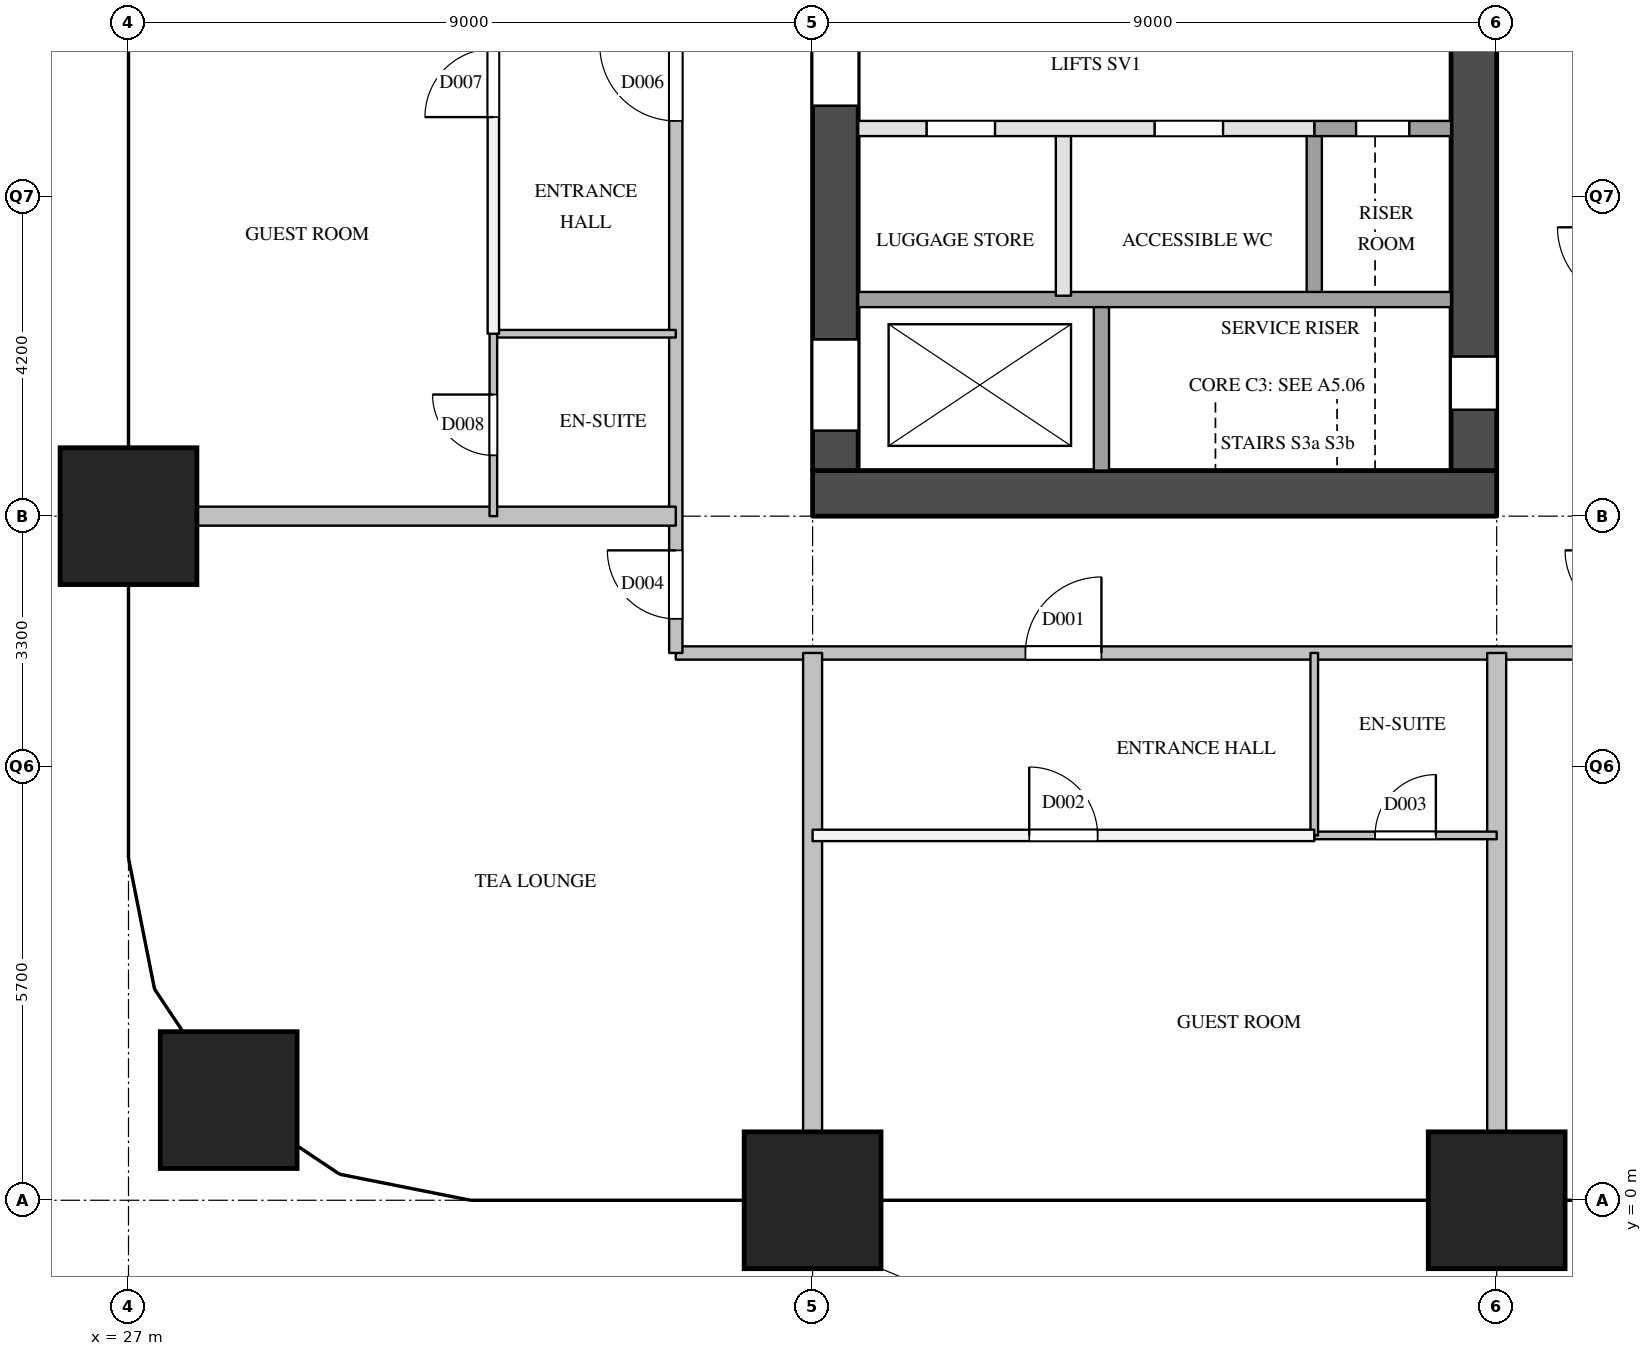
"""IFC4 building model, lengths in metres.
Left out: names, types, materials, properties, quantities, classifications, styles, units other than length and angle.
Written with IfcOpenShell. Run it as: python <this file> out.ifc"""

import sys

from ifc_helpers import new_model, si_unit, direction, frame, frame_2d, origin, origin_2d, place, context, subcontext, project, spatial, rectangle, extrude, element, fill, save


model = new_model("IFC4")
c1 = context("Model", 3, precision=1e-05, world=origin(), true_north=direction((0.0, 1.0)))
c2 = subcontext(c1, "Body", "Model", "MODEL_VIEW")
j1 = project(units=[si_unit("LENGTHUNIT", "METRE"), si_unit("PLANEANGLEUNIT", "RADIAN")], contexts=[c1])
p1 = place(None, origin())
s1 = spatial("IfcSite", under=j1, at=p1, CompositionType="ELEMENT")
p2 = place(p1, origin())
s2 = spatial("IfcBuilding", under=s1, at=p2, CompositionType="ELEMENT")
p3 = place(p2, frame((0.0, 0.0, 100.6)))
s3 = spatial("IfcBuildingStorey", under=s2, at=p3, CompositionType="ELEMENT", Elevation=100.6)
for number, where, z_axis, x_axis in (
    (1, (28.318, 1.318, 0.0), (0.0, 0.0, 1.0), (1.0, 0.0, 0.0)),
    (2, (27.0, 9.0, 0.0), (0.0, 0.0, 1.0), (1.0, 0.0, 0.0)),
    (3, (36.0, 0.0, 0.0), (0.0, 0.0, 1.0), (1.0, 0.0, 0.0)),
    (4, (45.0, 0.0, 0.0), (0.0, 0.0, 1.0), (1.0, 0.0, 0.0)),
):
    element("IfcColumn", number, at=place(p3, frame(where, z_axis=z_axis, x_axis=x_axis)), inside=s3, PredefinedType="COLUMN", context=c2, shape_type="SweptSolid", body=[
        extrude(rectangle(XDim=1.8, YDim=1.8, at=origin_2d()), origin(), (0.0, 0.0, 1.0), 3.8),
    ])
p4 = place(p3, frame((36.0, 9.3, 0.0), z_axis=(0.0, 0.0, 1.0), x_axis=(1.0, 0.0, 0.0)))
e5 = element("IfcWall", 5, at=p4, inside=s3, PredefinedType="SHEAR", context=c2, shape_type="SweptSolid", body=[
    extrude(rectangle(XDim=9.0, YDim=0.6, at=frame_2d((4.5, 0.0))), origin(), (0.0, 0.0, 1.0), 3.5),
])
p5 = place(p3, frame((36.3, 9.6, 0.0), z_axis=(0.0, 0.0, 1.0), x_axis=(0.0, 1.0, 0.0)))
e6 = element("IfcWall", 6, at=p5, inside=s3, PredefinedType="SHEAR", context=c2, shape_type="SweptSolid", body=[
    extrude(rectangle(XDim=12.3, YDim=0.6, at=frame_2d((6.15, 0.0))), origin(), (0.0, 0.0, 1.0), 3.5),
])
p6 = place(p5, frame((0.525, 0.0, 0.0)))
e7 = element("IfcOpeningElement", 7, at=p6, cuts=e6, PredefinedType="OPENING", context=c2, shape_type="SweptSolid", body=[
    extrude(rectangle(XDim=1.2, YDim=2.1, at=frame_2d((0.6, 1.05))), frame((0.0, 0.31, 0.0), z_axis=(0.0, -1.0, 0.0), x_axis=(1.0, 0.0, 0.0)), (0.0, 0.0, 1.0), 0.62),
])
p7 = place(p5, frame((4.8, 0.0, 0.0)))
e8 = element("IfcOpeningElement", 8, at=p7, cuts=e6, PredefinedType="OPENING", context=c2, shape_type="SweptSolid", body=[
    extrude(rectangle(XDim=1.0, YDim=2.1, at=frame_2d((0.5, 1.05))), frame((0.0, 0.31, 0.0), z_axis=(0.0, -1.0, 0.0), x_axis=(1.0, 0.0, 0.0)), (0.0, 0.0, 1.0), 0.62),
])
p8 = place(p3, frame((44.7, 9.6, 0.0), z_axis=(0.0, 0.0, 1.0), x_axis=(0.0, 1.0, 0.0)))
e9 = element("IfcWall", 9, at=p8, inside=s3, PredefinedType="SHEAR", context=c2, shape_type="SweptSolid", body=[
    extrude(rectangle(XDim=12.3, YDim=0.6, at=frame_2d((6.15, 0.0))), origin(), (0.0, 0.0, 1.0), 3.5),
])
p9 = place(p8, frame((0.8, 0.0, 0.0)))
e10 = element("IfcOpeningElement", 10, at=p9, cuts=e9, PredefinedType="OPENING", context=c2, shape_type="SweptSolid", body=[
    extrude(rectangle(XDim=0.7, YDim=2.1, at=frame_2d((0.35, 1.05))), frame((0.0, 0.31, 0.0), z_axis=(0.0, -1.0, 0.0), x_axis=(1.0, 0.0, 0.0)), (0.0, 0.0, 1.0), 0.62),
])
p10 = place(p3, frame((39.3, 11.9, 0.0), z_axis=(0.0, 0.0, 1.0), x_axis=(0.0, 1.0, 0.0)))
e11 = element("IfcWall", 11, at=p10, inside=s3, PredefinedType="PARTITIONING", context=c2, shape_type="SweptSolid", body=[
    extrude(rectangle(XDim=2.2, YDim=0.2, at=frame_2d((1.1, 0.0))), origin(), (0.0, 0.0, 1.0), 3.5),
])
p11 = place(p3, frame((39.8, 9.6, 0.0), z_axis=(0.0, 0.0, 1.0), x_axis=(0.0, 1.0, 0.0)))
e12 = element("IfcWall", 12, at=p11, inside=s3, PredefinedType="SOLIDWALL", context=c2, shape_type="SweptSolid", body=[
    extrude(rectangle(XDim=2.3, YDim=0.2, at=frame_2d((1.15, 0.0))), origin(), (0.0, 0.0, 1.0), 3.5),
])
p12 = place(p3, frame((42.6, 11.9, 0.0), z_axis=(0.0, 0.0, 1.0), x_axis=(0.0, 1.0, 0.0)))
e13 = element("IfcWall", 13, at=p12, inside=s3, PredefinedType="SOLIDWALL", context=c2, shape_type="SweptSolid", body=[
    extrude(rectangle(XDim=2.2, YDim=0.2, at=frame_2d((1.1, 0.0))), origin(), (0.0, 0.0, 1.0), 3.5),
])
p13 = place(p3, frame((36.6, 11.85, 0.0), z_axis=(0.0, 0.0, 1.0), x_axis=(1.0, 0.0, 0.0)))
e14 = element("IfcWall", 14, at=p13, inside=s3, PredefinedType="SOLIDWALL", context=c2, shape_type="SweptSolid", body=[
    extrude(rectangle(XDim=7.8, YDim=0.2, at=frame_2d((3.9, 0.0))), origin(), (0.0, 0.0, 1.0), 3.5),
])
p14 = place(p3, frame((36.6, 14.1, 0.0), z_axis=(0.0, 0.0, 1.0), x_axis=(1.0, 0.0, 0.0)))
e15 = element("IfcWall", 15, at=p14, inside=s3, PredefinedType="PARTITIONING", context=c2, shape_type="SweptSolid", body=[
    extrude(rectangle(XDim=6.0, YDim=0.2, at=frame_2d((3.0, 0.0))), origin(), (0.0, 0.0, 1.0), 3.5),
])
p15 = place(p14, frame((0.9, 0.0, 0.0)))
e16 = element("IfcOpeningElement", 16, at=p15, cuts=e15, PredefinedType="OPENING", context=c2, shape_type="SweptSolid", body=[
    extrude(rectangle(XDim=0.9, YDim=2.1, at=frame_2d((0.45, 1.05))), frame((0.0, 0.11, 0.0), z_axis=(0.0, -1.0, 0.0), x_axis=(1.0, 0.0, 0.0)), (0.0, 0.0, 1.0), 0.22),
])
p16 = place(p14, frame((3.9, 0.0, 0.0)))
e17 = element("IfcOpeningElement", 17, at=p16, cuts=e15, PredefinedType="OPENING", context=c2, shape_type="SweptSolid", body=[
    extrude(rectangle(XDim=0.9, YDim=2.1, at=frame_2d((0.45, 1.05))), frame((0.0, 0.11, 0.0), z_axis=(0.0, -1.0, 0.0), x_axis=(1.0, 0.0, 0.0)), (0.0, 0.0, 1.0), 0.22),
])
p17 = place(p3, frame((42.6, 14.1, 0.0), z_axis=(0.0, 0.0, 1.0), x_axis=(1.0, 0.0, 0.0)))
e18 = element("IfcWall", 18, at=p17, inside=s3, PredefinedType="SOLIDWALL", context=c2, shape_type="SweptSolid", body=[
    extrude(rectangle(XDim=1.8, YDim=0.2, at=frame_2d((0.9, 0.0))), origin(), (0.0, 0.0, 1.0), 3.5),
])
p18 = place(p17, frame((0.55, 0.0, 0.0)))
e19 = element("IfcOpeningElement", 19, at=p18, cuts=e18, PredefinedType="OPENING", context=c2, shape_type="SweptSolid", body=[
    extrude(rectangle(XDim=0.7, YDim=2.1, at=frame_2d((0.35, 1.05))), frame((0.0, 0.11, 0.0), z_axis=(0.0, -1.0, 0.0), x_axis=(1.0, 0.0, 0.0)), (0.0, 0.0, 1.0), 0.22),
])
p19 = place(p3, frame((34.2, 7.2, 0.0), z_axis=(0.0, 0.0, 1.0), x_axis=(1.0, 0.0, 0.0)))
e20 = element("IfcWall", 20, at=p19, inside=s3, PredefinedType="PARTITIONING", context=c2, shape_type="SweptSolid", body=[
    extrude(rectangle(XDim=12.6, YDim=0.175, at=frame_2d((6.3, 0.0))), origin(), (0.0, 0.0, 1.0), 3.5),
])
p20 = place(p19, frame((4.6, 0.0, 0.0)))
e21 = element("IfcOpeningElement", 21, at=p20, cuts=e20, PredefinedType="OPENING", context=c2, shape_type="SweptSolid", body=[
    extrude(rectangle(XDim=1.0, YDim=2.1, at=frame_2d((0.5, 1.05))), frame((0.0, 0.097, 0.0), z_axis=(0.0, -1.0, 0.0), x_axis=(1.0, 0.0, 0.0)), (0.0, 0.0, 1.0), 0.195),
])
p21 = place(p3, frame((34.2, 7.2, 0.0), z_axis=(0.0, 0.0, 1.0), x_axis=(0.0, 1.0, 0.0)))
e22 = element("IfcWall", 22, at=p21, inside=s3, PredefinedType="PARTITIONING", context=c2, shape_type="SweptSolid", body=[
    extrude(rectangle(XDim=16.49, YDim=0.175, at=frame_2d((8.245, 0.0))), origin(), (0.0, 0.0, 1.0), 3.5),
])
p22 = place(p21, frame((0.45, 0.0, 0.0)))
e23 = element("IfcOpeningElement", 23, at=p22, cuts=e22, PredefinedType="OPENING", context=c2, shape_type="SweptSolid", body=[
    extrude(rectangle(XDim=0.9, YDim=2.1, at=frame_2d((0.45, 1.05))), frame((0.0, 0.097, 0.0), z_axis=(0.0, -1.0, 0.0), x_axis=(1.0, 0.0, 0.0)), (0.0, 0.0, 1.0), 0.195),
])
p23 = place(p21, frame((7.0, 0.0, 0.0)))
e24 = element("IfcOpeningElement", 24, at=p23, cuts=e22, PredefinedType="OPENING", context=c2, shape_type="SweptSolid", body=[
    extrude(rectangle(XDim=1.0, YDim=2.1, at=frame_2d((0.5, 1.05))), frame((0.0, 0.097, 0.0), z_axis=(0.0, -1.0, 0.0), x_axis=(1.0, 0.0, 0.0)), (0.0, 0.0, 1.0), 0.195),
])
p24 = place(p21, frame((14.345, 0.0, 0.0)))
e25 = element("IfcOpeningElement", 25, at=p24, cuts=e22, PredefinedType="OPENING", context=c2, shape_type="SweptSolid", body=[
    extrude(rectangle(XDim=1.0, YDim=2.1, at=frame_2d((0.5, 1.05))), frame((0.0, 0.097, 0.0), z_axis=(0.0, -1.0, 0.0), x_axis=(1.0, 0.0, 0.0)), (0.0, 0.0, 1.0), 0.195),
])
p25 = place(p3, frame((36.0, 4.8, 0.0), z_axis=(0.0, 0.0, 1.0), x_axis=(1.0, 0.0, 0.0)))
e26 = element("IfcWall", 26, at=p25, inside=s3, PredefinedType="PARTITIONING", context=c2, shape_type="SweptSolid", body=[
    extrude(rectangle(XDim=6.6, YDim=0.15, at=frame_2d((3.3, 0.0))), origin(), (0.0, 0.0, 1.0), 3.5),
])
p26 = place(p25, frame((2.85, 0.0, 0.0)))
e27 = element("IfcOpeningElement", 27, at=p26, cuts=e26, PredefinedType="OPENING", context=c2, shape_type="SweptSolid", body=[
    extrude(rectangle(XDim=0.9, YDim=2.1, at=frame_2d((0.45, 1.05))), frame((0.0, 0.085, 0.0), z_axis=(0.0, -1.0, 0.0), x_axis=(1.0, 0.0, 0.0)), (0.0, 0.0, 1.0), 0.17),
])
p27 = place(p3, frame((31.8, 11.4, 0.0), z_axis=(0.0, 0.0, 1.0), x_axis=(0.0, 1.0, 0.0)))
e28 = element("IfcWall", 28, at=p27, inside=s3, PredefinedType="PARTITIONING", context=c2, shape_type="SweptSolid", body=[
    extrude(rectangle(XDim=6.6, YDim=0.15, at=frame_2d((3.3, 0.0))), origin(), (0.0, 0.0, 1.0), 3.5),
])
p28 = place(p27, frame((2.85, 0.0, 0.0)))
e29 = element("IfcOpeningElement", 29, at=p28, cuts=e28, PredefinedType="OPENING", context=c2, shape_type="SweptSolid", body=[
    extrude(rectangle(XDim=0.9, YDim=2.1, at=frame_2d((0.45, 1.05))), frame((0.0, 0.085, 0.0), z_axis=(0.0, -1.0, 0.0), x_axis=(1.0, 0.0, 0.0)), (0.0, 0.0, 1.0), 0.17),
])
for number, where, z_axis, x_axis in (
    (30, (27.0, 9.0, 0.0), (0.0, 0.0, 1.0), (1.0, 0.0, 0.0)),
    (31, (36.0, 0.0, 0.0), (0.0, 0.0, 1.0), (0.0, 1.0, 0.0)),
    (32, (45.0, 0.0, 0.0), (0.0, 0.0, 1.0), (0.0, 1.0, 0.0)),
):
    element("IfcWall", number, at=place(p3, frame(where, z_axis=z_axis, x_axis=x_axis)), inside=s3, PredefinedType="PARTITIONING", context=c2, shape_type="SweptSolid", body=[
        extrude(rectangle(XDim=7.2, YDim=0.25, at=frame_2d((3.6, 0.0))), origin(), (0.0, 0.0, 1.0), 3.5),
    ])
p29 = place(p3, frame((42.6, 4.8, 0.0), z_axis=(0.0, 0.0, 1.0), x_axis=(1.0, 0.0, 0.0)))
e33 = element("IfcWall", 33, at=p29, inside=s3, PredefinedType="PARTITIONING", context=c2, shape_type="SweptSolid", body=[
    extrude(rectangle(XDim=2.4, YDim=0.1, at=frame_2d((1.2, 0.0))), origin(), (0.0, 0.0, 1.0), 3.5),
])
p30 = place(p29, frame((0.8, 0.0, 0.0)))
e34 = element("IfcOpeningElement", 34, at=p30, cuts=e33, PredefinedType="OPENING", context=c2, shape_type="SweptSolid", body=[
    extrude(rectangle(XDim=0.8, YDim=2.1, at=frame_2d((0.4, 1.05))), frame((0.0, 0.06, 0.0), z_axis=(0.0, -1.0, 0.0), x_axis=(1.0, 0.0, 0.0)), (0.0, 0.0, 1.0), 0.12),
])
p31 = place(p3, frame((31.8, 11.4, 0.0), z_axis=(0.0, 0.0, 1.0), x_axis=(1.0, 0.0, 0.0)))
e35 = element("IfcWall", 35, at=p31, inside=s3, PredefinedType="PARTITIONING", context=c2, shape_type="SweptSolid", body=[
    extrude(rectangle(XDim=2.4, YDim=0.1, at=frame_2d((1.2, 0.0))), origin(), (0.0, 0.0, 1.0), 3.5),
])
p32 = place(p3, frame((31.8, 9.0, 0.0), z_axis=(0.0, 0.0, 1.0), x_axis=(0.0, 1.0, 0.0)))
e36 = element("IfcWall", 36, at=p32, inside=s3, PredefinedType="PARTITIONING", context=c2, shape_type="SweptSolid", body=[
    extrude(rectangle(XDim=2.4, YDim=0.1, at=frame_2d((1.2, 0.0))), origin(), (0.0, 0.0, 1.0), 3.5),
])
p33 = place(p32, frame((0.8, 0.0, 0.0)))
e37 = element("IfcOpeningElement", 37, at=p33, cuts=e36, PredefinedType="OPENING", context=c2, shape_type="SweptSolid", body=[
    extrude(rectangle(XDim=0.8, YDim=2.1, at=frame_2d((0.4, 1.05))), frame((0.0, 0.06, 0.0), z_axis=(0.0, -1.0, 0.0), x_axis=(1.0, 0.0, 0.0)), (0.0, 0.0, 1.0), 0.12),
])
p34 = place(p3, frame((42.6, 4.8, 0.0), z_axis=(0.0, 0.0, 1.0), x_axis=(0.0, 1.0, 0.0)))
e38 = element("IfcWall", 38, at=p34, inside=s3, PredefinedType="PARTITIONING", context=c2, shape_type="SweptSolid", body=[
    extrude(rectangle(XDim=2.4, YDim=0.1, at=frame_2d((1.2, 0.0))), origin(), (0.0, 0.0, 1.0), 3.5),
])
p35 = place(p6, origin())
e39 = element("IfcDoor", 39, at=p35, inside=s3, OperationType="SLIDING_TO_LEFT", PredefinedType="DOOR", context=c2, shape_type="SweptSolid", body=[
    extrude(rectangle(XDim=1.2, YDim=2.1, at=frame_2d((0.6, 1.05))), frame((0.0, 0.025, 0.0), z_axis=(0.0, -1.0, 0.0), x_axis=(1.0, 0.0, 0.0)), (0.0, 0.0, 1.0), 0.05),
])
fill(e7, e39)
p36 = place(p18, origin())
e40 = element("IfcDoor", 40, at=p36, inside=s3, OperationType="SINGLE_SWING_RIGHT", PredefinedType="DOOR", context=c2, shape_type="SweptSolid", body=[
    extrude(rectangle(XDim=0.7, YDim=2.1, at=frame_2d((0.35, 1.05))), frame((0.0, 0.025, 0.0), z_axis=(0.0, -1.0, 0.0), x_axis=(1.0, 0.0, 0.0)), (0.0, 0.0, 1.0), 0.05),
])
fill(e19, e40)
p37 = place(p9, origin())
e41 = element("IfcDoor", 41, at=p37, inside=s3, OperationType="SINGLE_SWING_LEFT", PredefinedType="DOOR", context=c2, shape_type="SweptSolid", body=[
    extrude(rectangle(XDim=0.7, YDim=2.1, at=frame_2d((0.35, 1.05))), frame((0.0, 0.025, 0.0), z_axis=(0.0, -1.0, 0.0), x_axis=(1.0, 0.0, 0.0)), (0.0, 0.0, 1.0), 0.05),
])
fill(e10, e41)
p38 = place(p7, origin())
e42 = element("IfcDoor", 42, at=p38, inside=s3, OperationType="SINGLE_SWING_LEFT", PredefinedType="DOOR", context=c2, shape_type="SweptSolid", body=[
    extrude(rectangle(XDim=1.0, YDim=2.1, at=frame_2d((0.5, 1.05))), frame((0.0, 0.025, 0.0), z_axis=(0.0, -1.0, 0.0), x_axis=(1.0, 0.0, 0.0)), (0.0, 0.0, 1.0), 0.05),
])
fill(e8, e42)
p39 = place(p15, origin())
e43 = element("IfcDoor", 43, at=p39, inside=s3, OperationType="SINGLE_SWING_LEFT", PredefinedType="DOOR", context=c2, shape_type="SweptSolid", body=[
    extrude(rectangle(XDim=0.9, YDim=2.1, at=frame_2d((0.45, 1.05))), frame((0.0, 0.025, 0.0), z_axis=(0.0, -1.0, 0.0), x_axis=(1.0, 0.0, 0.0)), (0.0, 0.0, 1.0), 0.05),
])
fill(e16, e43)
p40 = place(p16, origin())
e44 = element("IfcDoor", 44, at=p40, inside=s3, OperationType="SINGLE_SWING_RIGHT", PredefinedType="DOOR", context=c2, shape_type="SweptSolid", body=[
    extrude(rectangle(XDim=0.9, YDim=2.1, at=frame_2d((0.45, 1.05))), frame((0.0, 0.025, 0.0), z_axis=(0.0, -1.0, 0.0), x_axis=(1.0, 0.0, 0.0)), (0.0, 0.0, 1.0), 0.05),
])
fill(e17, e44)
p41 = place(p20, origin())
e45 = element("IfcDoor", 45, at=p41, inside=s3, OperationType="SINGLE_SWING_RIGHT", PredefinedType="DOOR", context=c2, shape_type="SweptSolid", body=[
    extrude(rectangle(XDim=1.0, YDim=2.1, at=frame_2d((0.5, 1.05))), frame((0.0, 0.025, 0.0), z_axis=(0.0, -1.0, 0.0), x_axis=(1.0, 0.0, 0.0)), (0.0, 0.0, 1.0), 0.05),
])
fill(e21, e45)
p42 = place(p26, origin())
e46 = element("IfcDoor", 46, at=p42, inside=s3, OperationType="SINGLE_SWING_LEFT", PredefinedType="DOOR", context=c2, shape_type="SweptSolid", body=[
    extrude(rectangle(XDim=0.9, YDim=2.1, at=frame_2d((0.45, 1.05))), frame((0.0, 0.025, 0.0), z_axis=(0.0, -1.0, 0.0), x_axis=(1.0, 0.0, 0.0)), (0.0, 0.0, 1.0), 0.05),
])
fill(e27, e46)
p43 = place(p30, origin())
e47 = element("IfcDoor", 47, at=p43, inside=s3, OperationType="SINGLE_SWING_RIGHT", PredefinedType="DOOR", context=c2, shape_type="SweptSolid", body=[
    extrude(rectangle(XDim=0.8, YDim=2.1, at=frame_2d((0.4, 1.05))), frame((0.0, 0.025, 0.0), z_axis=(0.0, -1.0, 0.0), x_axis=(1.0, 0.0, 0.0)), (0.0, 0.0, 1.0), 0.05),
])
fill(e34, e47)
p44 = place(p22, origin())
e48 = element("IfcDoor", 48, at=p44, inside=s3, OperationType="SINGLE_SWING_RIGHT", PredefinedType="DOOR", context=c2, shape_type="SweptSolid", body=[
    extrude(rectangle(XDim=0.9, YDim=2.1, at=frame_2d((0.45, 1.05))), frame((0.0, 0.025, 0.0), z_axis=(0.0, -1.0, 0.0), x_axis=(1.0, 0.0, 0.0)), (0.0, 0.0, 1.0), 0.05),
])
fill(e23, e48)
p45 = place(p23, origin())
e49 = element("IfcDoor", 49, at=p45, inside=s3, OperationType="SINGLE_SWING_RIGHT", PredefinedType="DOOR", context=c2, shape_type="SweptSolid", body=[
    extrude(rectangle(XDim=1.0, YDim=2.1, at=frame_2d((0.5, 1.05))), frame((0.0, 0.025, 0.0), z_axis=(0.0, -1.0, 0.0), x_axis=(1.0, 0.0, 0.0)), (0.0, 0.0, 1.0), 0.05),
])
fill(e24, e49)
p46 = place(p28, origin())
e50 = element("IfcDoor", 50, at=p46, inside=s3, OperationType="SINGLE_SWING_LEFT", PredefinedType="DOOR", context=c2, shape_type="SweptSolid", body=[
    extrude(rectangle(XDim=0.9, YDim=2.1, at=frame_2d((0.45, 1.05))), frame((0.0, 0.025, 0.0), z_axis=(0.0, -1.0, 0.0), x_axis=(1.0, 0.0, 0.0)), (0.0, 0.0, 1.0), 0.05),
])
fill(e29, e50)
p47 = place(p33, origin())
e51 = element("IfcDoor", 51, at=p47, inside=s3, OperationType="SINGLE_SWING_RIGHT", PredefinedType="DOOR", context=c2, shape_type="SweptSolid", body=[
    extrude(rectangle(XDim=0.8, YDim=2.1, at=frame_2d((0.4, 1.05))), frame((0.0, 0.025, 0.0), z_axis=(0.0, -1.0, 0.0), x_axis=(1.0, 0.0, 0.0)), (0.0, 0.0, 1.0), 0.05),
])
fill(e37, e51)
save(model, sys.argv[1])
